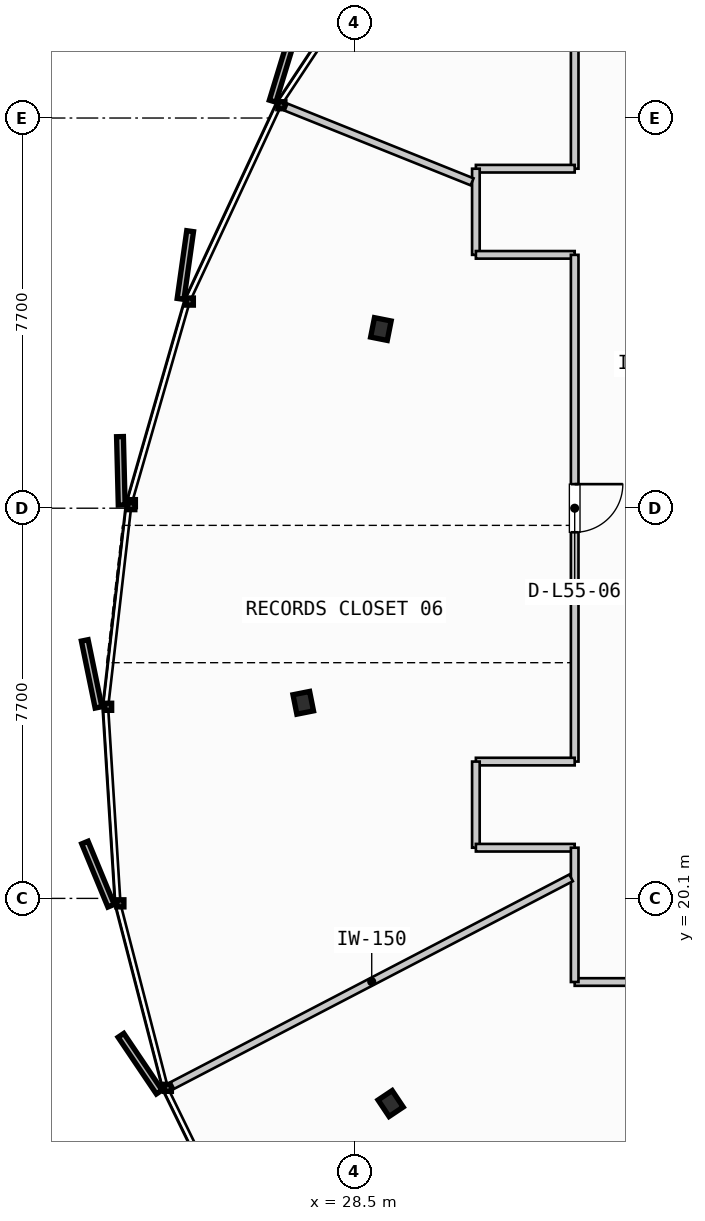
"""IFC4 building model, lengths in metres.
Left out: names, types, materials, properties, quantities, classifications, styles, units other than length and angle.
Written with IfcOpenShell. Run it as: python <this file> out.ifc"""

import sys

from ifc_helpers import new_model, si_unit, direction, frame, frame_2d, origin, origin_2d, place, context, subcontext, project, spatial, rectangle, i_section, extrude, source, transform, mapped, element, fill, save


model = new_model("IFC4")
c1 = context("Model", 3, precision=1e-05, world=origin(), true_north=direction((0.0, 1.0)))
c2 = subcontext(c1, "Body", "Model", "MODEL_VIEW")
j1 = project(units=[si_unit("LENGTHUNIT", "METRE"), si_unit("PLANEANGLEUNIT", "RADIAN")], contexts=[c1])
p1 = place(None, origin())
s1 = spatial("IfcSite", under=j1, at=p1, CompositionType="ELEMENT")
p2 = place(p1, origin())
s2 = spatial("IfcBuilding", under=s1, at=p2, CompositionType="ELEMENT")
p3 = place(p2, frame((0.0, 0.0, 211.4)))
s3 = spatial("IfcBuildingStorey", under=s2, at=p3, CompositionType="ELEMENT", Elevation=211.4)
m1 = source(origin(), c2, "Body", "SweptSolid", [
    extrude(i_section(OverallWidth=0.391, OverallDepth=0.335, WebThickness=0.023, FlangeThickness=0.034, FilletRadius=0.015, at=origin_2d()), origin(), (0.0, 0.0, 1.0), 3.26),
])
for number, where, z_axis, x_axis in (
    (1, (29.025, 31.336, 0.0), (0.0, 0.0, 1.0), (-0.981, 0.195, 0.0)),
    (2, (27.493, 23.96, 0.0), (0.0, 0.0, 1.0), (-0.981, -0.195, 0.0)),
    (3, (29.218, 16.052, 0.0), (0.0, 0.0, 1.0), (-0.831, -0.556, 0.0)),
):
    element("IfcColumn", number, at=place(p3, frame(where, z_axis=z_axis, x_axis=x_axis)), inside=s3, PredefinedType="COLUMN", context=c2, shape_type="MappedRepresentation", body=[
        mapped(m1, transform((0.0, 0.0, 0.0), scale=1.0)),
    ])
p4 = place(p3, frame((32.85, 18.45, 0.0), z_axis=(0.0, 0.0, 1.0), x_axis=(1.0, 0.0, 0.0)))
e4 = element("IfcWall", 4, at=p4, inside=s3, PredefinedType="PARTITIONING", context=c2, shape_type="SweptSolid", body=[
    extrude(rectangle(XDim=28.35, YDim=0.15, at=frame_2d((14.175, 0.0))), origin(), (0.0, 0.0, 1.0), 2.455),
])
p5 = place(p4, frame((5.035, 0.0, 0.0)))
e5 = element("IfcOpeningElement", 5, at=p5, cuts=e4, PredefinedType="OPENING", context=c2, shape_type="SweptSolid", body=[
    extrude(rectangle(XDim=0.95, YDim=2.15, at=frame_2d((0.475, 1.075))), frame((0.0, 0.085, 0.0), z_axis=(0.0, -1.0, 0.0), x_axis=(1.0, 0.0, 0.0)), (0.0, 0.0, 1.0), 0.17),
])
p6 = place(p4, frame((18.621, 0.0, 0.0)))
e6 = element("IfcOpeningElement", 6, at=p6, cuts=e4, PredefinedType="OPENING", context=c2, shape_type="SweptSolid", body=[
    extrude(rectangle(XDim=0.95, YDim=2.15, at=frame_2d((0.475, 1.075))), frame((0.0, 0.085, 0.0), z_axis=(0.0, -1.0, 0.0), x_axis=(1.0, 0.0, 0.0)), (0.0, 0.0, 1.0), 0.17),
])
p7 = place(p3, frame((32.85, 37.15, 0.0), z_axis=(0.0, 0.0, 1.0), x_axis=(0.0, -1.0, 0.0)))
e7 = element("IfcWall", 7, at=p7, inside=s3, PredefinedType="PARTITIONING", context=c2, shape_type="SweptSolid", body=[
    extrude(rectangle(XDim=2.65, YDim=0.15, at=frame_2d((1.325, 0.0))), origin(), (0.0, 0.0, 1.0), 2.455),
])
p8 = place(p3, frame((32.85, 34.5, 0.0), z_axis=(0.0, 0.0, 1.0), x_axis=(-1.0, 0.0, 0.0)))
e8 = element("IfcWall", 8, at=p8, inside=s3, PredefinedType="PARTITIONING", context=c2, shape_type="SweptSolid", body=[
    extrude(rectangle(XDim=1.95, YDim=0.15, at=frame_2d((0.975, 0.0))), origin(), (0.0, 0.0, 1.0), 2.455),
])
p9 = place(p3, frame((30.9, 34.5, 0.0), z_axis=(0.0, 0.0, 1.0), x_axis=(0.0, -1.0, 0.0)))
e9 = element("IfcWall", 9, at=p9, inside=s3, PredefinedType="PARTITIONING", context=c2, shape_type="SweptSolid", body=[
    extrude(rectangle(XDim=1.7, YDim=0.15, at=frame_2d((0.85, 0.0))), origin(), (0.0, 0.0, 1.0), 2.455),
])
p10 = place(p3, frame((30.9, 32.8, 0.0), z_axis=(0.0, 0.0, 1.0), x_axis=(1.0, 0.0, 0.0)))
e10 = element("IfcWall", 10, at=p10, inside=s3, PredefinedType="PARTITIONING", context=c2, shape_type="SweptSolid", body=[
    extrude(rectangle(XDim=1.95, YDim=0.15, at=frame_2d((0.975, 0.0))), origin(), (0.0, 0.0, 1.0), 2.455),
])
p11 = place(p3, frame((32.85, 32.8, 0.0), z_axis=(0.0, 0.0, 1.0), x_axis=(0.0, -1.0, 0.0)))
e11 = element("IfcWall", 11, at=p11, inside=s3, PredefinedType="PARTITIONING", context=c2, shape_type="SweptSolid", body=[
    extrude(rectangle(XDim=10.0, YDim=0.15, at=frame_2d((5.0, 0.0))), origin(), (0.0, 0.0, 1.0), 2.455),
])
p12 = place(p11, frame((4.525, 0.0, 0.0)))
e12 = element("IfcOpeningElement", 12, at=p12, cuts=e11, PredefinedType="OPENING", context=c2, shape_type="SweptSolid", body=[
    extrude(rectangle(XDim=0.95, YDim=2.15, at=frame_2d((0.475, 1.075))), frame((0.0, 0.085, 0.0), z_axis=(0.0, -1.0, 0.0), x_axis=(1.0, 0.0, 0.0)), (0.0, 0.0, 1.0), 0.17),
])
p13 = place(p3, frame((32.85, 22.8, 0.0), z_axis=(0.0, 0.0, 1.0), x_axis=(-1.0, 0.0, 0.0)))
e13 = element("IfcWall", 13, at=p13, inside=s3, PredefinedType="PARTITIONING", context=c2, shape_type="SweptSolid", body=[
    extrude(rectangle(XDim=1.95, YDim=0.15, at=frame_2d((0.975, 0.0))), origin(), (0.0, 0.0, 1.0), 2.455),
])
p14 = place(p3, frame((30.9, 22.8, 0.0), z_axis=(0.0, 0.0, 1.0), x_axis=(0.0, -1.0, 0.0)))
e14 = element("IfcWall", 14, at=p14, inside=s3, PredefinedType="PARTITIONING", context=c2, shape_type="SweptSolid", body=[
    extrude(rectangle(XDim=1.7, YDim=0.15, at=frame_2d((0.85, 0.0))), origin(), (0.0, 0.0, 1.0), 2.455),
])
p15 = place(p3, frame((30.9, 21.1, 0.0), z_axis=(0.0, 0.0, 1.0), x_axis=(1.0, 0.0, 0.0)))
e15 = element("IfcWall", 15, at=p15, inside=s3, PredefinedType="PARTITIONING", context=c2, shape_type="SweptSolid", body=[
    extrude(rectangle(XDim=1.95, YDim=0.15, at=frame_2d((0.975, 0.0))), origin(), (0.0, 0.0, 1.0), 2.455),
])
p16 = place(p3, frame((32.85, 21.1, 0.0), z_axis=(0.0, 0.0, 1.0), x_axis=(0.0, -1.0, 0.0)))
e16 = element("IfcWall", 16, at=p16, inside=s3, PredefinedType="PARTITIONING", context=c2, shape_type="SweptSolid", body=[
    extrude(rectangle(XDim=2.65, YDim=0.15, at=frame_2d((1.325, 0.0))), origin(), (0.0, 0.0, 1.0), 2.455),
])
p17 = place(p3, frame((32.779, 20.505, 0.0), z_axis=(0.0, 0.0, 1.0), x_axis=(-0.88697068139, -0.461825735916, 0.0)))
e17 = element("IfcWall", 17, at=p17, inside=s3, PredefinedType="PARTITIONING", context=c2, shape_type="SweptSolid", body=[
    extrude(rectangle(XDim=8.872, YDim=0.15, at=frame_2d((4.436, 0.0))), origin(), (0.0, 0.0, 1.0), 2.455),
])
p18 = place(p3, frame((30.826, 34.241, 0.0), z_axis=(0.0, 0.0, 1.0), x_axis=(-0.927965194186, 0.372666873197, 0.0)))
e18 = element("IfcWall", 18, at=p18, inside=s3, PredefinedType="PARTITIONING", context=c2, shape_type="SweptSolid", body=[
    extrude(rectangle(XDim=3.957, YDim=0.15, at=frame_2d((1.979, 0.0))), origin(), (0.0, 0.0, 1.0), 2.455),
])
m2 = source(origin(), c2, "Body", "SweptSolid", [
    extrude(rectangle(XDim=0.95, YDim=2.15, at=frame_2d((0.475, 1.075))), frame((0.0, 0.025, 0.0), z_axis=(0.0, -1.0, 0.0), x_axis=(1.0, 0.0, 0.0)), (0.0, 0.0, 1.0), 0.05),
])
p19 = place(p12, origin())
e19 = element("IfcDoor", 19, at=p19, inside=s3, OperationType="SINGLE_SWING_LEFT", PredefinedType="DOOR", context=c2, shape_type="MappedRepresentation", body=[
    mapped(m2, transform((0.0, 0.0, 0.0), scale=1.0)),
])
fill(e12, e19)
save(model, sys.argv[1])
